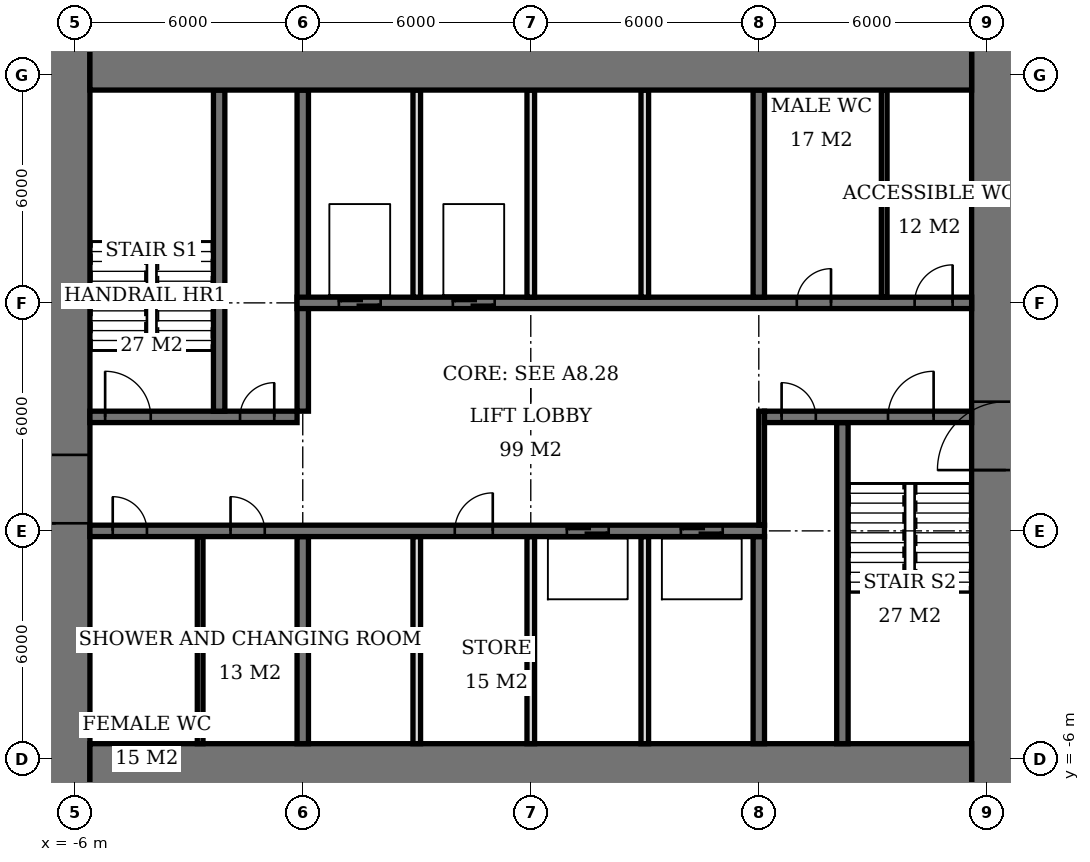
"""IFC4 building model, lengths in metres.
Left out: names, types, materials, properties, quantities, classifications, styles, units other than length and angle.
Written with IfcOpenShell. Run it as: python <this file> out.ifc"""

import sys

from ifc_helpers import new_model, si_unit, direction, frame, frame_2d, origin, place, context, subcontext, project, spatial, rectangle, extrude, element, fill, save


model = new_model("IFC4")
c1 = context("Model", 3, precision=1e-05, world=origin(), true_north=direction((0.0, 1.0)))
c2 = subcontext(c1, "Body", "Model", "MODEL_VIEW")
j1 = project(units=[si_unit("LENGTHUNIT", "METRE"), si_unit("PLANEANGLEUNIT", "RADIAN")], contexts=[c1])
p1 = place(None, origin())
s1 = spatial("IfcSite", under=j1, at=p1, CompositionType="ELEMENT")
p2 = place(p1, origin())
s2 = spatial("IfcBuilding", under=s1, at=p2, CompositionType="ELEMENT")
p3 = place(p2, frame((0.0, 0.0, 264.5)))
s3 = spatial("IfcBuildingStorey", under=s2, at=p3, CompositionType="ELEMENT", Elevation=264.5)
for number, where, z_axis, x_axis in (
    (1, (-5.6, -6.6, 0.0), (0.0, 0.0, 1.0), (1.0, 0.0, 0.0)),
    (2, (-5.6, 12.6, 0.0), (0.0, 0.0, 1.0), (1.0, 0.0, 0.0)),
):
    element("IfcWall", number, at=place(p3, frame(where, z_axis=z_axis, x_axis=x_axis)), inside=s3, PredefinedType="SHEAR", context=c2, shape_type="SweptSolid", body=[
        extrude(rectangle(XDim=23.2, YDim=2.0, at=frame_2d((11.6, 0.0))), origin(), (0.0, 0.0, 1.0), 3.9),
    ])
p4 = place(p3, frame((-6.5, -7.6, 0.0), z_axis=(0.0, 0.0, 1.0), x_axis=(0.0, 1.0, 0.0)))
e3 = element("IfcWall", 3, at=p4, inside=s3, PredefinedType="SHEAR", context=c2, shape_type="SweptSolid", body=[
    extrude(rectangle(XDim=21.2, YDim=1.8, at=frame_2d((10.6, 0.0))), origin(), (0.0, 0.0, 1.0), 3.9),
])
p5 = place(p4, frame((7.8, 0.0, 0.0)))
e4 = element("IfcOpeningElement", 4, at=p5, cuts=e3, PredefinedType="OPENING", context=c2, shape_type="SweptSolid", body=[
    extrude(rectangle(XDim=1.8, YDim=2.4, at=frame_2d((0.9, 1.2))), frame((0.0, 0.91, 0.0), z_axis=(0.0, -1.0, 0.0), x_axis=(1.0, 0.0, 0.0)), (0.0, 0.0, 1.0), 1.82),
])
p6 = place(p3, frame((18.5, -7.6, 0.0), z_axis=(0.0, 0.0, 1.0), x_axis=(0.0, 1.0, 0.0)))
e5 = element("IfcWall", 5, at=p6, inside=s3, PredefinedType="SHEAR", context=c2, shape_type="SweptSolid", body=[
    extrude(rectangle(XDim=21.2, YDim=1.8, at=frame_2d((10.6, 0.0))), origin(), (0.0, 0.0, 1.0), 3.9),
])
p7 = place(p6, frame((9.2, 0.0, 0.0)))
e6 = element("IfcOpeningElement", 6, at=p7, cuts=e5, PredefinedType="OPENING", context=c2, shape_type="SweptSolid", body=[
    extrude(rectangle(XDim=1.8, YDim=2.4, at=frame_2d((0.9, 1.2))), frame((0.0, 0.91, 0.0), z_axis=(0.0, -1.0, 0.0), x_axis=(1.0, 0.0, 0.0)), (0.0, 0.0, 1.0), 1.82),
])
p8 = place(p3, frame((-5.6, 0.0, 0.0), z_axis=(0.0, 0.0, 1.0), x_axis=(1.0, 0.0, 0.0)))
e7 = element("IfcWall", 7, at=p8, inside=s3, PredefinedType="SHEAR", context=c2, shape_type="SweptSolid", body=[
    extrude(rectangle(XDim=17.75, YDim=0.3, at=frame_2d((8.875, 0.0))), origin(), (0.0, 0.0, 1.0), 3.9),
])
p9 = place(p8, frame((0.6, 0.0, 0.0)))
e8 = element("IfcOpeningElement", 8, at=p9, cuts=e7, PredefinedType="OPENING", context=c2, shape_type="SweptSolid", body=[
    extrude(rectangle(XDim=0.9, YDim=2.1, at=frame_2d((0.45, 1.05))), frame((0.0, 0.16, 0.0), z_axis=(0.0, -1.0, 0.0), x_axis=(1.0, 0.0, 0.0)), (0.0, 0.0, 1.0), 0.32),
])
p10 = place(p8, frame((3.7, 0.0, 0.0)))
e9 = element("IfcOpeningElement", 9, at=p10, cuts=e7, PredefinedType="OPENING", context=c2, shape_type="SweptSolid", body=[
    extrude(rectangle(XDim=0.9, YDim=2.1, at=frame_2d((0.45, 1.05))), frame((0.0, 0.16, 0.0), z_axis=(0.0, -1.0, 0.0), x_axis=(1.0, 0.0, 0.0)), (0.0, 0.0, 1.0), 0.32),
])
p11 = place(p8, frame((9.6, 0.0, 0.0)))
e10 = element("IfcOpeningElement", 10, at=p11, cuts=e7, PredefinedType="OPENING", context=c2, shape_type="SweptSolid", body=[
    extrude(rectangle(XDim=1.0, YDim=2.1, at=frame_2d((0.5, 1.05))), frame((0.0, 0.16, 0.0), z_axis=(0.0, -1.0, 0.0), x_axis=(1.0, 0.0, 0.0)), (0.0, 0.0, 1.0), 0.32),
])
p12 = place(p8, frame((12.55, 0.0, 0.0)))
e11 = element("IfcOpeningElement", 11, at=p12, cuts=e7, PredefinedType="OPENING", context=c2, shape_type="SweptSolid", body=[
    extrude(rectangle(XDim=1.1, YDim=2.1, at=frame_2d((0.55, 1.05))), frame((0.0, 0.16, 0.0), z_axis=(0.0, -1.0, 0.0), x_axis=(1.0, 0.0, 0.0)), (0.0, 0.0, 1.0), 0.32),
])
p13 = place(p8, frame((15.55, 0.0, 0.0)))
e12 = element("IfcOpeningElement", 12, at=p13, cuts=e7, PredefinedType="OPENING", context=c2, shape_type="SweptSolid", body=[
    extrude(rectangle(XDim=1.1, YDim=2.1, at=frame_2d((0.55, 1.05))), frame((0.0, 0.16, 0.0), z_axis=(0.0, -1.0, 0.0), x_axis=(1.0, 0.0, 0.0)), (0.0, 0.0, 1.0), 0.32),
])
p14 = place(p3, frame((-5.6, 3.0, 0.0), z_axis=(0.0, 0.0, 1.0), x_axis=(1.0, 0.0, 0.0)))
e13 = element("IfcWall", 13, at=p14, inside=s3, PredefinedType="SHEAR", context=c2, shape_type="SweptSolid", body=[
    extrude(rectangle(XDim=5.45, YDim=0.3, at=frame_2d((2.725, 0.0))), origin(), (0.0, 0.0, 1.0), 3.9),
])
p15 = place(p14, frame((0.4, 0.0, 0.0)))
e14 = element("IfcOpeningElement", 14, at=p15, cuts=e13, PredefinedType="OPENING", context=c2, shape_type="SweptSolid", body=[
    extrude(rectangle(XDim=1.2, YDim=2.1, at=frame_2d((0.6, 1.05))), frame((0.0, 0.16, 0.0), z_axis=(0.0, -1.0, 0.0), x_axis=(1.0, 0.0, 0.0)), (0.0, 0.0, 1.0), 0.32),
])
p16 = place(p14, frame((3.95, 0.0, 0.0)))
e15 = element("IfcOpeningElement", 15, at=p16, cuts=e13, PredefinedType="OPENING", context=c2, shape_type="SweptSolid", body=[
    extrude(rectangle(XDim=0.9, YDim=2.1, at=frame_2d((0.45, 1.05))), frame((0.0, 0.16, 0.0), z_axis=(0.0, -1.0, 0.0), x_axis=(1.0, 0.0, 0.0)), (0.0, 0.0, 1.0), 0.32),
])
p17 = place(p3, frame((12.15, 3.0, 0.0), z_axis=(0.0, 0.0, 1.0), x_axis=(1.0, 0.0, 0.0)))
e16 = element("IfcWall", 16, at=p17, inside=s3, PredefinedType="SHEAR", context=c2, shape_type="SweptSolid", body=[
    extrude(rectangle(XDim=5.45, YDim=0.3, at=frame_2d((2.725, 0.0))), origin(), (0.0, 0.0, 1.0), 3.9),
])
p18 = place(p17, frame((3.25, 0.0, 0.0)))
e17 = element("IfcOpeningElement", 17, at=p18, cuts=e16, PredefinedType="OPENING", context=c2, shape_type="SweptSolid", body=[
    extrude(rectangle(XDim=1.2, YDim=2.1, at=frame_2d((0.6, 1.05))), frame((0.0, 0.16, 0.0), z_axis=(0.0, -1.0, 0.0), x_axis=(1.0, 0.0, 0.0)), (0.0, 0.0, 1.0), 0.32),
])
p19 = place(p17, frame((0.45, 0.0, 0.0)))
e18 = element("IfcOpeningElement", 18, at=p19, cuts=e16, PredefinedType="OPENING", context=c2, shape_type="SweptSolid", body=[
    extrude(rectangle(XDim=0.9, YDim=2.1, at=frame_2d((0.45, 1.05))), frame((0.0, 0.16, 0.0), z_axis=(0.0, -1.0, 0.0), x_axis=(1.0, 0.0, 0.0)), (0.0, 0.0, 1.0), 0.32),
])
p20 = place(p3, frame((-0.15, 6.0, 0.0), z_axis=(0.0, 0.0, 1.0), x_axis=(1.0, 0.0, 0.0)))
e19 = element("IfcWall", 19, at=p20, inside=s3, PredefinedType="SHEAR", context=c2, shape_type="SweptSolid", body=[
    extrude(rectangle(XDim=17.75, YDim=0.3, at=frame_2d((8.875, 0.0))), origin(), (0.0, 0.0, 1.0), 3.9),
])
p21 = place(p20, frame((13.15, 0.0, 0.0)))
e20 = element("IfcOpeningElement", 20, at=p21, cuts=e19, PredefinedType="OPENING", context=c2, shape_type="SweptSolid", body=[
    extrude(rectangle(XDim=0.9, YDim=2.1, at=frame_2d((0.45, 1.05))), frame((0.0, 0.16, 0.0), z_axis=(0.0, -1.0, 0.0), x_axis=(1.0, 0.0, 0.0)), (0.0, 0.0, 1.0), 0.32),
])
p22 = place(p20, frame((16.25, 0.0, 0.0)))
e21 = element("IfcOpeningElement", 21, at=p22, cuts=e19, PredefinedType="OPENING", context=c2, shape_type="SweptSolid", body=[
    extrude(rectangle(XDim=1.0, YDim=2.1, at=frame_2d((0.5, 1.05))), frame((0.0, 0.16, 0.0), z_axis=(0.0, -1.0, 0.0), x_axis=(1.0, 0.0, 0.0)), (0.0, 0.0, 1.0), 0.32),
])
p23 = place(p20, frame((1.1, 0.0, 0.0)))
e22 = element("IfcOpeningElement", 22, at=p23, cuts=e19, PredefinedType="OPENING", context=c2, shape_type="SweptSolid", body=[
    extrude(rectangle(XDim=1.1, YDim=2.1, at=frame_2d((0.55, 1.05))), frame((0.0, 0.16, 0.0), z_axis=(0.0, -1.0, 0.0), x_axis=(1.0, 0.0, 0.0)), (0.0, 0.0, 1.0), 0.32),
])
p24 = place(p20, frame((4.1, 0.0, 0.0)))
e23 = element("IfcOpeningElement", 23, at=p24, cuts=e19, PredefinedType="OPENING", context=c2, shape_type="SweptSolid", body=[
    extrude(rectangle(XDim=1.1, YDim=2.1, at=frame_2d((0.55, 1.05))), frame((0.0, 0.16, 0.0), z_axis=(0.0, -1.0, 0.0), x_axis=(1.0, 0.0, 0.0)), (0.0, 0.0, 1.0), 0.32),
])
p25 = place(p3, frame((0.0, -5.6, 0.0), z_axis=(0.0, 0.0, 1.0), x_axis=(0.0, 1.0, 0.0)))
e24 = element("IfcWall", 24, at=p25, inside=s3, PredefinedType="SHEAR", context=c2, shape_type="SweptSolid", body=[
    extrude(rectangle(XDim=5.45, YDim=0.3, at=frame_2d((2.725, 0.0))), origin(), (0.0, 0.0, 1.0), 3.9),
])
p26 = place(p3, frame((0.0, 3.15, 0.0), z_axis=(0.0, 0.0, 1.0), x_axis=(0.0, 1.0, 0.0)))
e25 = element("IfcWall", 25, at=p26, inside=s3, PredefinedType="SHEAR", context=c2, shape_type="SweptSolid", body=[
    extrude(rectangle(XDim=8.45, YDim=0.3, at=frame_2d((4.225, 0.0))), origin(), (0.0, 0.0, 1.0), 3.9),
])
for number, where, z_axis, x_axis in (
    (26, (12.0, -5.6, 0.0), (0.0, 0.0, 1.0), (0.0, 1.0, 0.0)),
    (27, (12.0, 6.15, 0.0), (0.0, 0.0, 1.0), (0.0, 1.0, 0.0)),
):
    element("IfcWall", number, at=place(p3, frame(where, z_axis=z_axis, x_axis=x_axis)), inside=s3, PredefinedType="SHEAR", context=c2, shape_type="SweptSolid", body=[
        extrude(rectangle(XDim=5.45, YDim=0.3, at=frame_2d((2.725, 0.0))), origin(), (0.0, 0.0, 1.0), 3.9),
    ])
for number, where, z_axis, x_axis in (
    (28, (-2.2, 3.15, 0.0), (0.0, 0.0, 1.0), (0.0, 1.0, 0.0)),
    (29, (14.2, -5.6, 0.0), (0.0, 0.0, 1.0), (0.0, 1.0, 0.0)),
):
    element("IfcWall", number, at=place(p3, frame(where, z_axis=z_axis, x_axis=x_axis)), inside=s3, PredefinedType="SHEAR", context=c2, shape_type="SweptSolid", body=[
        extrude(rectangle(XDim=8.45, YDim=0.3, at=frame_2d((4.225, 0.0))), origin(), (0.0, 0.0, 1.0), 3.9),
    ])
for number, where, z_axis, x_axis in (
    (30, (3.0, 6.15, 0.0), (0.0, 0.0, 1.0), (0.0, 1.0, 0.0)),
    (31, (6.0, 6.15, 0.0), (0.0, 0.0, 1.0), (0.0, 1.0, 0.0)),
    (32, (9.0, 6.15, 0.0), (0.0, 0.0, 1.0), (0.0, 1.0, 0.0)),
    (33, (3.0, -5.6, 0.0), (0.0, 0.0, 1.0), (0.0, 1.0, 0.0)),
    (34, (6.0, -5.6, 0.0), (0.0, 0.0, 1.0), (0.0, 1.0, 0.0)),
    (35, (9.0, -5.6, 0.0), (0.0, 0.0, 1.0), (0.0, 1.0, 0.0)),
):
    element("IfcWall", number, at=place(p3, frame(where, z_axis=z_axis, x_axis=x_axis)), inside=s3, PredefinedType="SOLIDWALL", context=c2, shape_type="SweptSolid", body=[
        extrude(rectangle(XDim=5.45, YDim=0.2, at=frame_2d((2.725, 0.0))), origin(), (0.0, 0.0, 1.0), 3.9),
    ])
for number, where, z_axis, x_axis in (
    (36, (-2.7, -5.6, 0.0), (0.0, 0.0, 1.0), (0.0, 1.0, 0.0)),
    (37, (15.3, 6.15, 0.0), (0.0, 0.0, 1.0), (0.0, 1.0, 0.0)),
):
    element("IfcWall", number, at=place(p3, frame(where, z_axis=z_axis, x_axis=x_axis)), inside=s3, PredefinedType="PLUMBINGWALL", context=c2, shape_type="SweptSolid", body=[
        extrude(rectangle(XDim=5.45, YDim=0.15, at=frame_2d((2.725, 0.0))), origin(), (0.0, 0.0, 1.0), 3.65),
    ])
p27 = place(p3, frame((12.075, 0.15, 0.0), z_axis=(0.0, 0.0, 1.0), x_axis=(0.0, 1.0, 0.0)))
e38 = element("IfcWall", 38, at=p27, inside=s3, PredefinedType="PARTITIONING", context=c2, shape_type="SweptSolid", body=[
    extrude(rectangle(XDim=3.0, YDim=0.15, at=frame_2d((1.5, 0.0))), origin(), (0.0, 0.0, 1.0), 3.65),
])
p28 = place(p5, origin())
e39 = element("IfcDoor", 39, at=p28, inside=s3, OperationType="DOUBLE_DOOR_SINGLE_SWING", PredefinedType="DOOR", context=c2, shape_type="SweptSolid", body=[
    extrude(rectangle(XDim=1.8, YDim=2.4, at=frame_2d((0.9, 1.2))), frame((0.0, 0.025, 0.0), z_axis=(0.0, -1.0, 0.0), x_axis=(1.0, 0.0, 0.0)), (0.0, 0.0, 1.0), 0.05),
])
fill(e4, e39)
p29 = place(p7, origin())
e40 = element("IfcDoor", 40, at=p29, inside=s3, OperationType="DOUBLE_DOOR_SINGLE_SWING", PredefinedType="DOOR", context=c2, shape_type="SweptSolid", body=[
    extrude(rectangle(XDim=1.8, YDim=2.4, at=frame_2d((0.9, 1.2))), frame((0.0, 0.025, 0.0), z_axis=(0.0, -1.0, 0.0), x_axis=(1.0, 0.0, 0.0)), (0.0, 0.0, 1.0), 0.05),
])
fill(e6, e40)
p30 = place(p15, origin())
e41 = element("IfcDoor", 41, at=p30, inside=s3, OperationType="SINGLE_SWING_LEFT", PredefinedType="DOOR", context=c2, shape_type="SweptSolid", body=[
    extrude(rectangle(XDim=1.2, YDim=2.1, at=frame_2d((0.6, 1.05))), frame((0.0, 0.025, 0.0), z_axis=(0.0, -1.0, 0.0), x_axis=(1.0, 0.0, 0.0)), (0.0, 0.0, 1.0), 0.05),
])
fill(e14, e41)
p31 = place(p16, origin())
e42 = element("IfcDoor", 42, at=p31, inside=s3, OperationType="SINGLE_SWING_RIGHT", PredefinedType="DOOR", context=c2, shape_type="SweptSolid", body=[
    extrude(rectangle(XDim=0.9, YDim=2.1, at=frame_2d((0.45, 1.05))), frame((0.0, 0.025, 0.0), z_axis=(0.0, -1.0, 0.0), x_axis=(1.0, 0.0, 0.0)), (0.0, 0.0, 1.0), 0.05),
])
fill(e15, e42)
p32 = place(p18, origin())
e43 = element("IfcDoor", 43, at=p32, inside=s3, OperationType="SINGLE_SWING_RIGHT", PredefinedType="DOOR", context=c2, shape_type="SweptSolid", body=[
    extrude(rectangle(XDim=1.2, YDim=2.1, at=frame_2d((0.6, 1.05))), frame((0.0, 0.025, 0.0), z_axis=(0.0, -1.0, 0.0), x_axis=(1.0, 0.0, 0.0)), (0.0, 0.0, 1.0), 0.05),
])
fill(e17, e43)
p33 = place(p19, origin())
e44 = element("IfcDoor", 44, at=p33, inside=s3, OperationType="SINGLE_SWING_LEFT", PredefinedType="DOOR", context=c2, shape_type="SweptSolid", body=[
    extrude(rectangle(XDim=0.9, YDim=2.1, at=frame_2d((0.45, 1.05))), frame((0.0, 0.025, 0.0), z_axis=(0.0, -1.0, 0.0), x_axis=(1.0, 0.0, 0.0)), (0.0, 0.0, 1.0), 0.05),
])
fill(e18, e44)
p34 = place(p9, origin())
e45 = element("IfcDoor", 45, at=p34, inside=s3, OperationType="SINGLE_SWING_LEFT", PredefinedType="DOOR", context=c2, shape_type="SweptSolid", body=[
    extrude(rectangle(XDim=0.9, YDim=2.1, at=frame_2d((0.45, 1.05))), frame((0.0, 0.025, 0.0), z_axis=(0.0, -1.0, 0.0), x_axis=(1.0, 0.0, 0.0)), (0.0, 0.0, 1.0), 0.05),
])
fill(e8, e45)
p35 = place(p10, origin())
e46 = element("IfcDoor", 46, at=p35, inside=s3, OperationType="SINGLE_SWING_LEFT", PredefinedType="DOOR", context=c2, shape_type="SweptSolid", body=[
    extrude(rectangle(XDim=0.9, YDim=2.1, at=frame_2d((0.45, 1.05))), frame((0.0, 0.025, 0.0), z_axis=(0.0, -1.0, 0.0), x_axis=(1.0, 0.0, 0.0)), (0.0, 0.0, 1.0), 0.05),
])
fill(e9, e46)
p36 = place(p21, origin())
e47 = element("IfcDoor", 47, at=p36, inside=s3, OperationType="SINGLE_SWING_RIGHT", PredefinedType="DOOR", context=c2, shape_type="SweptSolid", body=[
    extrude(rectangle(XDim=0.9, YDim=2.1, at=frame_2d((0.45, 1.05))), frame((0.0, 0.025, 0.0), z_axis=(0.0, -1.0, 0.0), x_axis=(1.0, 0.0, 0.0)), (0.0, 0.0, 1.0), 0.05),
])
fill(e20, e47)
p37 = place(p22, origin())
e48 = element("IfcDoor", 48, at=p37, inside=s3, OperationType="SINGLE_SWING_RIGHT", PredefinedType="DOOR", context=c2, shape_type="SweptSolid", body=[
    extrude(rectangle(XDim=1.0, YDim=2.1, at=frame_2d((0.5, 1.05))), frame((0.0, 0.025, 0.0), z_axis=(0.0, -1.0, 0.0), x_axis=(1.0, 0.0, 0.0)), (0.0, 0.0, 1.0), 0.05),
])
fill(e21, e48)
p38 = place(p11, origin())
e49 = element("IfcDoor", 49, at=p38, inside=s3, OperationType="SINGLE_SWING_RIGHT", PredefinedType="DOOR", context=c2, shape_type="SweptSolid", body=[
    extrude(rectangle(XDim=1.0, YDim=2.1, at=frame_2d((0.5, 1.05))), frame((0.0, 0.025, 0.0), z_axis=(0.0, -1.0, 0.0), x_axis=(1.0, 0.0, 0.0)), (0.0, 0.0, 1.0), 0.05),
])
fill(e10, e49)
p39 = place(p23, origin())
e50 = element("IfcDoor", 50, at=p39, inside=s3, OperationType="DOUBLE_DOOR_SLIDING", PredefinedType="USERDEFINED", context=c2, shape_type="SweptSolid", body=[
    extrude(rectangle(XDim=1.1, YDim=2.1, at=frame_2d((0.55, 1.05))), frame((0.0, 0.025, 0.0), z_axis=(0.0, -1.0, 0.0), x_axis=(1.0, 0.0, 0.0)), (0.0, 0.0, 1.0), 0.05),
])
fill(e22, e50)
p40 = place(p24, origin())
e51 = element("IfcDoor", 51, at=p40, inside=s3, OperationType="DOUBLE_DOOR_SLIDING", PredefinedType="USERDEFINED", context=c2, shape_type="SweptSolid", body=[
    extrude(rectangle(XDim=1.1, YDim=2.1, at=frame_2d((0.55, 1.05))), frame((0.0, 0.025, 0.0), z_axis=(0.0, -1.0, 0.0), x_axis=(1.0, 0.0, 0.0)), (0.0, 0.0, 1.0), 0.05),
])
fill(e23, e51)
p41 = place(p12, origin())
e52 = element("IfcDoor", 52, at=p41, inside=s3, OperationType="DOUBLE_DOOR_SLIDING", PredefinedType="USERDEFINED", context=c2, shape_type="SweptSolid", body=[
    extrude(rectangle(XDim=1.1, YDim=2.1, at=frame_2d((0.55, 1.05))), frame((0.0, 0.025, 0.0), z_axis=(0.0, -1.0, 0.0), x_axis=(1.0, 0.0, 0.0)), (0.0, 0.0, 1.0), 0.05),
])
fill(e11, e52)
p42 = place(p13, origin())
e53 = element("IfcDoor", 53, at=p42, inside=s3, OperationType="DOUBLE_DOOR_SLIDING", PredefinedType="USERDEFINED", context=c2, shape_type="SweptSolid", body=[
    extrude(rectangle(XDim=1.1, YDim=2.1, at=frame_2d((0.55, 1.05))), frame((0.0, 0.025, 0.0), z_axis=(0.0, -1.0, 0.0), x_axis=(1.0, 0.0, 0.0)), (0.0, 0.0, 1.0), 0.05),
])
fill(e12, e53)
save(model, sys.argv[1])
